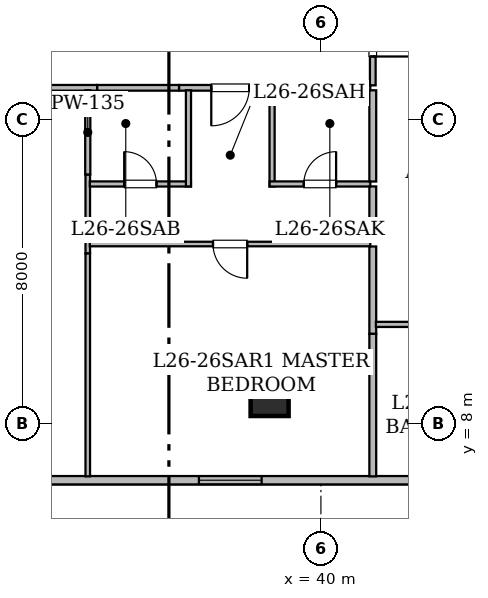
"""IFC4 building model, lengths in metres.
Left out: names, types, materials, properties, quantities, classifications, styles, units other than length and angle.
Written with IfcOpenShell. Run it as: python <this file> out.ifc"""

import sys

from ifc_helpers import new_model, si_unit, direction, frame, frame_2d, origin, origin_2d, place, context, subcontext, project, spatial, rectangle, hollow_rectangle, extrude, element, fill, save


model = new_model("IFC4")
c1 = context("Model", 3, precision=1e-05, world=origin(), true_north=direction((0.0, 1.0)))
c2 = subcontext(c1, "Body", "Model", "MODEL_VIEW")
j1 = project(units=[si_unit("LENGTHUNIT", "METRE"), si_unit("PLANEANGLEUNIT", "RADIAN")], contexts=[c1])
p1 = place(None, origin())
s1 = spatial("IfcSite", under=j1, at=p1, CompositionType="ELEMENT")
p2 = place(p1, origin())
s2 = spatial("IfcBuilding", under=s1, at=p2, CompositionType="ELEMENT")
p3 = place(p2, frame((0.0, 0.0, 105.55)))
s3 = spatial("IfcBuildingStorey", under=s2, at=p3, CompositionType="ELEMENT", Elevation=105.55)
p4 = place(p3, frame((38.65, 8.7, 0.0), z_axis=(0.0, 0.0, 1.0), x_axis=(1.0, 0.0, 0.0)))
e1 = element("IfcColumn", 1, at=p4, inside=s3, PredefinedType="COLUMN", context=c2, shape_type="SweptSolid", body=[
    extrude(hollow_rectangle(XDim=1.0, YDim=1.0, WallThickness=0.05, at=origin_2d()), origin(), (0.0, 0.0, 1.0), 3.65),
])
p5 = place(p3, frame((52.283, 6.51, 0.0), z_axis=(0.0, 0.0, 1.0), x_axis=(-1.0, 0.0, 0.0)))
e2 = element("IfcWall", 2, at=p5, inside=s3, PredefinedType="STANDARD", context=c2, shape_type="SweptSolid", body=[
    extrude(rectangle(XDim=38.568, YDim=0.22, at=frame_2d((19.284, 0.0))), origin(), (0.0, 0.0, 1.0), 3.43),
])
p6 = place(p5, frame((21.108, 0.0, 0.85)))
e3 = element("IfcOpeningElement", 3, at=p6, cuts=e2, PredefinedType="OPENING", context=c2, shape_type="SweptSolid", body=[
    extrude(rectangle(XDim=1.65, YDim=1.55, at=frame_2d((0.825, 0.775))), frame((0.0, 0.12, 0.0), z_axis=(0.0, -1.0, 0.0), x_axis=(1.0, 0.0, 0.0)), (0.0, 0.0, 1.0), 0.24),
])
p7 = place(p5, frame((35.355, 0.0, 0.85)))
e4 = element("IfcOpeningElement", 4, at=p7, cuts=e2, PredefinedType="OPENING", context=c2, shape_type="SweptSolid", body=[
    extrude(rectangle(XDim=1.65, YDim=1.55, at=frame_2d((0.825, 0.775))), frame((0.0, 0.12, 0.0), z_axis=(0.0, -1.0, 0.0), x_axis=(1.0, 0.0, 0.0)), (0.0, 0.0, 1.0), 0.24),
])
p8 = place(p5, frame((29.413, 0.0, 0.8)))
e5 = element("IfcOpeningElement", 5, at=p8, cuts=e2, PredefinedType="OPENING", context=c2, shape_type="SweptSolid", body=[
    extrude(rectangle(XDim=1.2, YDim=1.5, at=frame_2d((0.6, 0.75))), frame((0.0, 0.12, 0.0), z_axis=(0.0, -1.0, 0.0), x_axis=(1.0, 0.0, 0.0)), (0.0, 0.0, 1.0), 0.24),
])
p9 = place(p5, frame((31.863, 0.0, 0.85)))
e6 = element("IfcOpeningElement", 6, at=p9, cuts=e2, PredefinedType="OPENING", context=c2, shape_type="SweptSolid", body=[
    extrude(rectangle(XDim=1.65, YDim=1.55, at=frame_2d((0.825, 0.775))), frame((0.0, 0.12, 0.0), z_axis=(0.0, -1.0, 0.0), x_axis=(1.0, 0.0, 0.0)), (0.0, 0.0, 1.0), 0.24),
])
p10 = place(p5, frame((26.513, 0.0, 0.85)))
e7 = element("IfcOpeningElement", 7, at=p10, cuts=e2, PredefinedType="OPENING", context=c2, shape_type="SweptSolid", body=[
    extrude(rectangle(XDim=1.65, YDim=1.55, at=frame_2d((0.825, 0.775))), frame((0.0, 0.12, 0.0), z_axis=(0.0, -1.0, 0.0), x_axis=(1.0, 0.0, 0.0)), (0.0, 0.0, 1.0), 0.24),
])
p11 = place(p5, frame((13.843, 0.0, 0.85)))
e8 = element("IfcOpeningElement", 8, at=p11, cuts=e2, PredefinedType="OPENING", context=c2, shape_type="SweptSolid", body=[
    extrude(rectangle(XDim=1.65, YDim=1.55, at=frame_2d((0.825, 0.775))), frame((0.0, 0.12, 0.0), z_axis=(0.0, -1.0, 0.0), x_axis=(1.0, 0.0, 0.0)), (0.0, 0.0, 1.0), 0.24),
])
p12 = place(p5, frame((1.479, 0.0, 0.85)))
e9 = element("IfcOpeningElement", 9, at=p12, cuts=e2, PredefinedType="OPENING", context=c2, shape_type="SweptSolid", body=[
    extrude(rectangle(XDim=1.65, YDim=1.55, at=frame_2d((0.825, 0.775))), frame((0.0, 0.12, 0.0), z_axis=(0.0, -1.0, 0.0), x_axis=(1.0, 0.0, 0.0)), (0.0, 0.0, 1.0), 0.24),
])
p13 = place(p3, frame((34.114, 16.835, 0.0), z_axis=(0.0, 0.0, 1.0), x_axis=(-1.0, 0.0, 0.0)))
e10 = element("IfcWall", 10, at=p13, inside=s3, PredefinedType="STANDARD", context=c2, shape_type="SweptSolid", body=[
    extrude(rectangle(XDim=7.214, YDim=0.15, at=frame_2d((3.607, 0.0))), origin(), (0.0, 0.0, 1.0), 2.647),
])
p14 = place(p13, frame((3.053, 0.0, 0.0)))
e11 = element("IfcOpeningElement", 11, at=p14, cuts=e10, PredefinedType="OPENING", context=c2, shape_type="SweptSolid", body=[
    extrude(rectangle(XDim=1.15, YDim=2.2, at=frame_2d((0.575, 1.1))), frame((0.0, 0.085, 0.0), z_axis=(0.0, -1.0, 0.0), x_axis=(1.0, 0.0, 0.0)), (0.0, 0.0, 1.0), 0.17),
])
p15 = place(p3, frame((38.964, 16.835, 0.0), z_axis=(0.0, 0.0, 1.0), x_axis=(-1.0, 0.0, 0.0)))
e12 = element("IfcWall", 12, at=p15, inside=s3, PredefinedType="STANDARD", context=c2, shape_type="SweptSolid", body=[
    extrude(rectangle(XDim=2.698, YDim=0.15, at=frame_2d((1.349, 0.0))), origin(), (0.0, 0.0, 1.0), 3.43),
])
p16 = place(p15, frame((0.849, 0.0, 0.0)))
e13 = element("IfcOpeningElement", 13, at=p16, cuts=e12, PredefinedType="OPENING", context=c2, shape_type="SweptSolid", body=[
    extrude(rectangle(XDim=1.0, YDim=2.15, at=frame_2d((0.5, 1.075))), frame((0.0, 0.085, 0.0), z_axis=(0.0, -1.0, 0.0), x_axis=(1.0, 0.0, 0.0)), (0.0, 0.0, 1.0), 0.17),
])
p17 = place(p3, frame((36.266, 16.835, 0.0), z_axis=(0.0, 0.0, 1.0), x_axis=(-1.0, 0.0, 0.0)))
e14 = element("IfcWall", 14, at=p17, inside=s3, PredefinedType="STANDARD", context=c2, shape_type="SweptSolid", body=[
    extrude(rectangle(XDim=2.152, YDim=0.15, at=frame_2d((1.076, 0.0))), origin(), (0.0, 0.0, 1.0), 3.43),
])
p18 = place(p3, frame((41.3, 16.835, 0.0), z_axis=(0.0, 0.0, 1.0), x_axis=(-1.0, 0.0, 0.0)))
e15 = element("IfcWall", 15, at=p18, inside=s3, PredefinedType="STANDARD", context=c2, shape_type="SweptSolid", body=[
    extrude(rectangle(XDim=2.336, YDim=0.15, at=frame_2d((1.168, 0.0))), origin(), (0.0, 0.0, 1.0), 2.647),
])
p19 = place(p3, frame((41.365, 19.459, 0.0), z_axis=(0.0, 0.0, 1.0), x_axis=(0.0, -1.0, 0.0)))
e16 = element("IfcWall", 16, at=p19, inside=s3, PredefinedType="STANDARD", context=c2, shape_type="SweptSolid", body=[
    extrude(rectangle(XDim=2.559, YDim=0.15, at=frame_2d((1.28, 0.0))), origin(), (0.0, 0.0, 1.0), 2.647),
])
p20 = place(p19, frame((0.8, 0.0, 0.0)))
e17 = element("IfcOpeningElement", 17, at=p20, cuts=e16, PredefinedType="OPENING", context=c2, shape_type="SweptSolid", body=[
    extrude(rectangle(XDim=1.0, YDim=2.15, at=frame_2d((0.5, 1.075))), frame((0.0, 0.085, 0.0), z_axis=(0.0, -1.0, 0.0), x_axis=(1.0, 0.0, 0.0)), (0.0, 0.0, 1.0), 0.17),
])
p21 = place(p3, frame((33.865, 14.554, 0.0), z_axis=(0.0, 0.0, 1.0), x_axis=(0.0, -1.0, 0.0)))
e18 = element("IfcWall", 18, at=p21, inside=s3, PredefinedType="PARTITIONING", context=c2, shape_type="SweptSolid", body=[
    extrude(rectangle(XDim=2.078, YDim=0.12, at=frame_2d((1.039, 0.0))), origin(), (0.0, 0.0, 1.0), 3.43),
])
p22 = place(p3, frame((33.865, 16.77, 0.0), z_axis=(0.0, 0.0, 1.0), x_axis=(0.0, -1.0, 0.0)))
e19 = element("IfcWall", 19, at=p22, inside=s3, PredefinedType="PARTITIONING", context=c2, shape_type="SweptSolid", body=[
    extrude(rectangle(XDim=2.216, YDim=0.135, at=frame_2d((1.108, 0.0))), origin(), (0.0, 0.0, 1.0), 3.43),
])
p23 = place(p3, frame((33.865, 12.476, 0.0), z_axis=(0.0, 0.0, 1.0), x_axis=(0.0, -1.0, 0.0)))
e20 = element("IfcWall", 20, at=p23, inside=s3, PredefinedType="PARTITIONING", context=c2, shape_type="SweptSolid", body=[
    extrude(rectangle(XDim=5.864, YDim=0.12, at=frame_2d((2.932, 0.0))), origin(), (0.0, 0.0, 1.0), 2.876),
])
p24 = place(p3, frame((33.919, 14.305, 0.0), z_axis=(0.0, 0.0, 1.0), x_axis=(1.0, 0.0, 0.0)))
e21 = element("IfcWall", 21, at=p24, inside=s3, PredefinedType="PARTITIONING", context=c2, shape_type="SweptSolid", body=[
    extrude(rectangle(XDim=2.661, YDim=0.135, at=frame_2d((1.331, 0.0))), origin(), (0.0, 0.0, 1.0), 3.43),
])
p25 = place(p24, frame((0.905, 0.0, 0.0)))
e22 = element("IfcOpeningElement", 22, at=p25, cuts=e21, PredefinedType="OPENING", context=c2, shape_type="SweptSolid", body=[
    extrude(rectangle(XDim=0.85, YDim=2.1, at=frame_2d((0.425, 1.05))), frame((0.0, 0.077, 0.0), z_axis=(0.0, -1.0, 0.0), x_axis=(1.0, 0.0, 0.0)), (0.0, 0.0, 1.0), 0.155),
])
p26 = place(p3, frame((36.515, 14.24, 0.0), z_axis=(0.0, 0.0, 1.0), x_axis=(0.0, 1.0, 0.0)))
e23 = element("IfcWall", 23, at=p26, inside=s3, PredefinedType="PARTITIONING", context=c2, shape_type="SweptSolid", body=[
    extrude(rectangle(XDim=2.53, YDim=0.135, at=frame_2d((1.265, 0.0))), origin(), (0.0, 0.0, 1.0), 3.43),
])
p27 = place(p3, frame((38.715, 16.77, 0.0), z_axis=(0.0, 0.0, 1.0), x_axis=(0.0, -1.0, 0.0)))
e24 = element("IfcWall", 24, at=p27, inside=s3, PredefinedType="PARTITIONING", context=c2, shape_type="SweptSolid", body=[
    extrude(rectangle(XDim=2.53, YDim=0.135, at=frame_2d((1.265, 0.0))), origin(), (0.0, 0.0, 1.0), 2.647),
])
p28 = place(p3, frame((38.65, 14.305, 0.0), z_axis=(0.0, 0.0, 1.0), x_axis=(1.0, 0.0, 0.0)))
e25 = element("IfcWall", 25, at=p28, inside=s3, PredefinedType="PARTITIONING", context=c2, shape_type="SweptSolid", body=[
    extrude(rectangle(XDim=2.65, YDim=0.135, at=frame_2d((1.325, 0.0))), origin(), (0.0, 0.0, 1.0), 2.647),
])
p29 = place(p28, frame((0.9, 0.0, 0.0)))
e26 = element("IfcOpeningElement", 26, at=p29, cuts=e25, PredefinedType="OPENING", context=c2, shape_type="SweptSolid", body=[
    extrude(rectangle(XDim=0.85, YDim=2.1, at=frame_2d((0.425, 1.05))), frame((0.0, 0.077, 0.0), z_axis=(0.0, -1.0, 0.0), x_axis=(1.0, 0.0, 0.0)), (0.0, 0.0, 1.0), 0.155),
])
p30 = place(p3, frame((41.3, 12.725, 0.0), z_axis=(0.0, 0.0, 1.0), x_axis=(-1.0, 0.0, 0.0)))
e27 = element("IfcWall", 27, at=p30, inside=s3, PredefinedType="PARTITIONING", context=c2, shape_type="SweptSolid", body=[
    extrude(rectangle(XDim=7.381, YDim=0.12, at=frame_2d((3.69, 0.0))), origin(), (0.0, 0.0, 1.0), 2.647),
])
p31 = place(p30, frame((3.24, 0.0, 0.0)))
e28 = element("IfcOpeningElement", 28, at=p31, cuts=e27, PredefinedType="OPENING", context=c2, shape_type="SweptSolid", body=[
    extrude(rectangle(XDim=0.9, YDim=2.1, at=frame_2d((0.45, 1.05))), frame((0.0, 0.07, 0.0), z_axis=(0.0, -1.0, 0.0), x_axis=(1.0, 0.0, 0.0)), (0.0, 0.0, 1.0), 0.14),
])
p32 = place(p3, frame((41.365, 14.24, 0.0), z_axis=(0.0, 0.0, 1.0), x_axis=(0.0, -1.0, 0.0)))
e29 = element("IfcWall", 29, at=p32, inside=s3, PredefinedType="STANDARD", context=c2, shape_type="SweptSolid", body=[
    extrude(rectangle(XDim=1.45, YDim=0.18, at=frame_2d((0.725, 0.0))), origin(), (0.0, 0.0, 1.0), 3.43),
])
p33 = place(p3, frame((41.365, 16.77, 0.0), z_axis=(0.0, 0.0, 1.0), x_axis=(0.0, -1.0, 0.0)))
e30 = element("IfcWall", 30, at=p33, inside=s3, PredefinedType="STANDARD", context=c2, shape_type="SweptSolid", body=[
    extrude(rectangle(XDim=2.4, YDim=0.18, at=frame_2d((1.2, 0.0))), origin(), (0.0, 0.0, 1.0), 3.43),
])
p34 = place(p3, frame((41.365, 12.66, 0.0), z_axis=(0.0, 0.0, 1.0), x_axis=(0.0, -1.0, 0.0)))
e31 = element("IfcWall", 31, at=p34, inside=s3, PredefinedType="STANDARD", context=c2, shape_type="SweptSolid", body=[
    extrude(rectangle(XDim=2.299, YDim=0.18, at=frame_2d((1.149, 0.0))), origin(), (0.0, 0.0, 1.0), 3.43),
])
p35 = place(p3, frame((41.365, 10.361, 0.0), z_axis=(0.0, 0.0, 1.0), x_axis=(0.0, -1.0, 0.0)))
e32 = element("IfcWall", 32, at=p35, inside=s3, PredefinedType="STANDARD", context=c2, shape_type="SweptSolid", body=[
    extrude(rectangle(XDim=3.749, YDim=0.18, at=frame_2d((1.875, 0.0))), origin(), (0.0, 0.0, 1.0), 2.876),
])
p36 = place(p3, frame((44.229, 10.61, 0.0), z_axis=(0.0, 0.0, 1.0), x_axis=(-1.0, 0.0, 0.0)))
e33 = element("IfcWall", 33, at=p36, inside=s3, PredefinedType="PARTITIONING", context=c2, shape_type="SweptSolid", body=[
    extrude(rectangle(XDim=2.782, YDim=0.135, at=frame_2d((1.391, 0.0))), origin(), (0.0, 0.0, 1.0), 3.43),
])
p37 = place(p36, frame((0.987, 0.0, 0.0)))
e34 = element("IfcOpeningElement", 34, at=p37, cuts=e33, PredefinedType="OPENING", context=c2, shape_type="SweptSolid", body=[
    extrude(rectangle(XDim=0.85, YDim=2.1, at=frame_2d((0.425, 1.05))), frame((0.0, 0.077, 0.0), z_axis=(0.0, -1.0, 0.0), x_axis=(1.0, 0.0, 0.0)), (0.0, 0.0, 1.0), 0.155),
])
p38 = place(p11, origin())
e35 = element("IfcWindow", 35, at=p38, inside=s3, PartitioningType="SINGLE_PANEL", PredefinedType="WINDOW", context=c2, shape_type="SweptSolid", body=[
    extrude(rectangle(XDim=1.65, YDim=1.55, at=frame_2d((0.825, 0.775))), frame((0.0, 0.03, 0.0), z_axis=(0.0, -1.0, 0.0), x_axis=(1.0, 0.0, 0.0)), (0.0, 0.0, 1.0), 0.06),
])
fill(e8, e35)
p39 = place(p16, origin())
e36 = element("IfcDoor", 36, at=p39, inside=s3, OperationType="SINGLE_SWING_RIGHT", PredefinedType="DOOR", context=c2, shape_type="SweptSolid", body=[
    extrude(rectangle(XDim=1.0, YDim=2.15, at=frame_2d((0.5, 1.075))), frame((0.0, 0.025, 0.0), z_axis=(0.0, -1.0, 0.0), x_axis=(1.0, 0.0, 0.0)), (0.0, 0.0, 1.0), 0.05),
])
fill(e13, e36)
p40 = place(p20, origin())
e37 = element("IfcDoor", 37, at=p40, inside=s3, OperationType="SINGLE_SWING_RIGHT", PredefinedType="DOOR", context=c2, shape_type="SweptSolid", body=[
    extrude(rectangle(XDim=1.0, YDim=2.15, at=frame_2d((0.5, 1.075))), frame((0.0, 0.025, 0.0), z_axis=(0.0, -1.0, 0.0), x_axis=(1.0, 0.0, 0.0)), (0.0, 0.0, 1.0), 0.05),
])
fill(e17, e37)
p41 = place(p25, origin())
e38 = element("IfcDoor", 38, at=p41, inside=s3, OperationType="SINGLE_SWING_LEFT", PredefinedType="DOOR", context=c2, shape_type="SweptSolid", body=[
    extrude(rectangle(XDim=0.85, YDim=2.1, at=frame_2d((0.425, 1.05))), frame((0.0, 0.025, 0.0), z_axis=(0.0, -1.0, 0.0), x_axis=(1.0, 0.0, 0.0)), (0.0, 0.0, 1.0), 0.05),
])
fill(e22, e38)
p42 = place(p29, origin())
e39 = element("IfcDoor", 39, at=p42, inside=s3, OperationType="SINGLE_SWING_RIGHT", PredefinedType="DOOR", context=c2, shape_type="SweptSolid", body=[
    extrude(rectangle(XDim=0.85, YDim=2.1, at=frame_2d((0.425, 1.05))), frame((0.0, 0.025, 0.0), z_axis=(0.0, -1.0, 0.0), x_axis=(1.0, 0.0, 0.0)), (0.0, 0.0, 1.0), 0.05),
])
fill(e26, e39)
p43 = place(p31, origin())
e40 = element("IfcDoor", 40, at=p43, inside=s3, OperationType="SINGLE_SWING_LEFT", PredefinedType="DOOR", context=c2, shape_type="SweptSolid", body=[
    extrude(rectangle(XDim=0.9, YDim=2.1, at=frame_2d((0.45, 1.05))), frame((0.0, 0.025, 0.0), z_axis=(0.0, -1.0, 0.0), x_axis=(1.0, 0.0, 0.0)), (0.0, 0.0, 1.0), 0.05),
])
fill(e28, e40)
save(model, sys.argv[1])
